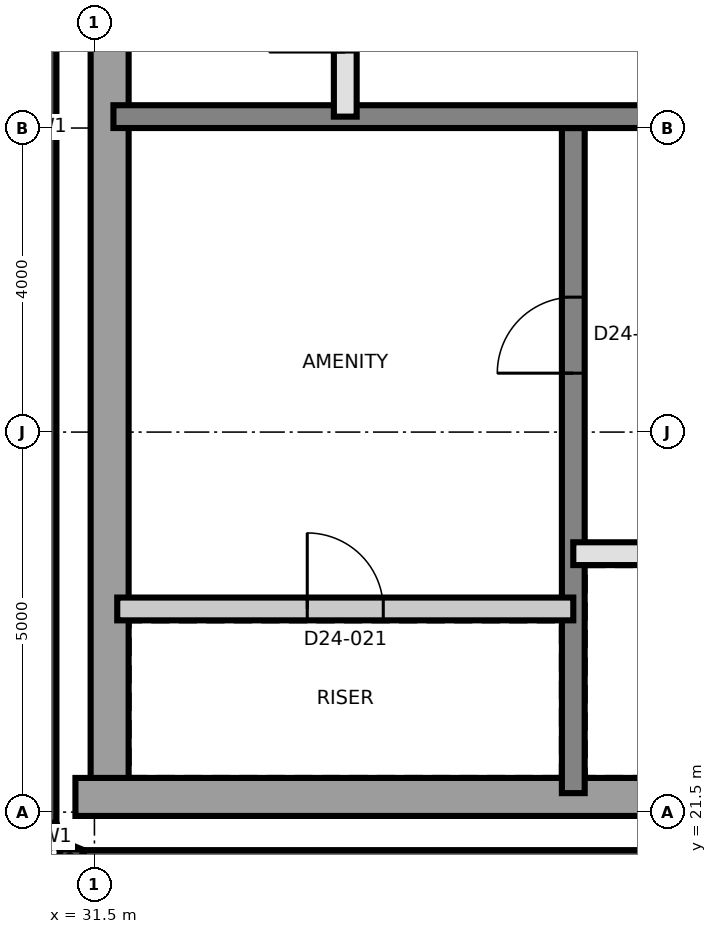
"""IFC4 building model, lengths in metres.
Left out: names, types, materials, properties, quantities, classifications, styles, units other than length and angle.
Written with IfcOpenShell. Run it as: python <this file> out.ifc"""

import sys

from ifc_helpers import new_model, si_unit, direction, frame, frame_2d, origin, place, context, subcontext, project, spatial, rectangle, extrude, element, fill, save


model = new_model("IFC4")
c1 = context("Model", 3, precision=1e-05, world=origin(), true_north=direction((0.0, 1.0)))
c2 = subcontext(c1, "Body", "Model", "MODEL_VIEW")
j1 = project(units=[si_unit("LENGTHUNIT", "METRE"), si_unit("PLANEANGLEUNIT", "RADIAN")], contexts=[c1])
p1 = place(None, origin())
s1 = spatial("IfcSite", under=j1, at=p1, CompositionType="ELEMENT")
p2 = place(p1, origin())
s2 = spatial("IfcBuilding", under=s1, at=p2, CompositionType="ELEMENT")
p3 = place(p2, frame((0.0, 0.0, 218.0)))
s3 = spatial("IfcBuildingStorey", under=s2, at=p3, CompositionType="ELEMENT", Elevation=218.0)
p4 = place(p3, frame((31.7, 21.75, 0.0), z_axis=(0.0, 0.0, 1.0), x_axis=(0.0, 1.0, 0.0)))
e1 = element("IfcWall", 1, at=p4, inside=s3, PredefinedType="SHEAR", context=c2, shape_type="SweptSolid", body=[
    extrude(rectangle(XDim=17.5, YDim=0.5, at=frame_2d((8.75, 0.0))), origin(), (0.0, 0.0, 1.0), 3.7),
])
p5 = place(p3, frame((31.25, 21.7, 0.0), z_axis=(0.0, 0.0, 1.0), x_axis=(1.0, 0.0, 0.0)))
e2 = element("IfcWall", 2, at=p5, inside=s3, PredefinedType="SHEAR", context=c2, shape_type="SweptSolid", body=[
    extrude(rectangle(XDim=27.0, YDim=0.5, at=frame_2d((13.5, 0.0))), origin(), (0.0, 0.0, 1.0), 3.7),
])
p6 = place(p3, frame((37.8, 21.75, 0.0), z_axis=(0.0, 0.0, 1.0), x_axis=(0.0, 1.0, 0.0)))
e3 = element("IfcWall", 3, at=p6, inside=s3, PredefinedType="SHEAR", context=c2, shape_type="SweptSolid", body=[
    extrude(rectangle(XDim=8.75, YDim=0.3, at=frame_2d((4.375, 0.0))), origin(), (0.0, 0.0, 1.0), 3.7),
])
p7 = place(p6, frame((5.525, 0.0, 0.0)))
e4 = element("IfcOpeningElement", 4, at=p7, cuts=e3, PredefinedType="OPENING", context=c2, shape_type="SweptSolid", body=[
    extrude(rectangle(XDim=1.0, YDim=2.1, at=frame_2d((0.5, 1.05))), frame((0.0, 0.16, 0.0), z_axis=(0.0, -1.0, 0.0), x_axis=(1.0, 0.0, 0.0)), (0.0, 0.0, 1.0), 0.32),
])
p8 = place(p3, frame((31.75, 30.65, 0.0), z_axis=(0.0, 0.0, 1.0), x_axis=(1.0, 0.0, 0.0)))
e5 = element("IfcWall", 5, at=p8, inside=s3, PredefinedType="SHEAR", context=c2, shape_type="SweptSolid", body=[
    extrude(rectangle(XDim=26.5, YDim=0.3, at=frame_2d((13.25, 0.0))), origin(), (0.0, 0.0, 1.0), 3.7),
])
p9 = place(p8, frame((24.75, 0.0, 0.0)))
e6 = element("IfcOpeningElement", 6, at=p9, cuts=e5, PredefinedType="OPENING", context=c2, shape_type="SweptSolid", body=[
    extrude(rectangle(XDim=1.0, YDim=2.1, at=frame_2d((0.5, 1.05))), frame((0.0, 0.16, 0.0), z_axis=(0.0, -1.0, 0.0), x_axis=(1.0, 0.0, 0.0)), (0.0, 0.0, 1.0), 0.32),
])
p10 = place(p3, frame((30.85, 39.67, 0.0), z_axis=(0.0, 0.0, 1.0), x_axis=(0.0, -1.0, 0.0)))
e7 = element("IfcWall", 7, at=p10, inside=s3, PredefinedType="SOLIDWALL", context=c2, shape_type="SweptSolid", body=[
    extrude(rectangle(XDim=18.31, YDim=0.3, at=frame_2d((9.155, 0.0))), origin(), (0.0, 0.0, 1.0), 3.4),
])
for number, where, z_axis, x_axis in (
    (8, (30.861, 21.302, 0.0), (0.0, 0.0, 1.0), (0.383, -0.924, 0.0)),
    (9, (31.048, 20.967, 0.0), (0.0, 0.0, 1.0), (0.924, -0.383, 0.0)),
):
    element("IfcWall", number, at=place(p3, frame(where, z_axis=z_axis, x_axis=x_axis)), inside=s3, PredefinedType="SOLIDWALL", context=c2, shape_type="SweptSolid", body=[
        extrude(rectangle(XDim=0.275, YDim=0.3, at=frame_2d((0.138, 0.0))), origin(), (0.0, 0.0, 1.0), 3.4),
    ])
p11 = place(p3, frame((31.36, 20.85, 0.0), z_axis=(0.0, 0.0, 1.0), x_axis=(1.0, 0.0, 0.0)))
e10 = element("IfcWall", 10, at=p11, inside=s3, PredefinedType="SOLIDWALL", context=c2, shape_type="SweptSolid", body=[
    extrude(rectangle(XDim=27.281, YDim=0.3, at=frame_2d((13.64, 0.0))), origin(), (0.0, 0.0, 1.0), 3.4),
])
p12 = place(p3, frame((31.8, 24.173, 0.0), z_axis=(0.0, 0.0, 1.0), x_axis=(1.0, 0.0, 0.0)))
e11 = element("IfcWall", 11, at=p12, inside=s3, PredefinedType="PARTITIONING", context=c2, shape_type="SweptSolid", body=[
    extrude(rectangle(XDim=6.0, YDim=0.3, at=frame_2d((3.0, 0.0))), origin(), (0.0, 0.0, 1.0), 3.4),
])
p13 = place(p12, frame((2.5, 0.0, 0.0)))
e12 = element("IfcOpeningElement", 12, at=p13, cuts=e11, PredefinedType="OPENING", context=c2, shape_type="SweptSolid", body=[
    extrude(rectangle(XDim=1.0, YDim=2.1, at=frame_2d((0.5, 1.05))), frame((0.0, 0.16, 0.0), z_axis=(0.0, -1.0, 0.0), x_axis=(1.0, 0.0, 0.0)), (0.0, 0.0, 1.0), 0.32),
])
p14 = place(p3, frame((37.8, 24.9, 0.0), z_axis=(0.0, 0.0, 1.0), x_axis=(1.0, 0.0, 0.0)))
e13 = element("IfcWall", 13, at=p14, inside=s3, PredefinedType="SOLIDWALL", context=c2, shape_type="SweptSolid", body=[
    extrude(rectangle(XDim=12.0, YDim=0.3, at=frame_2d((6.0, 0.0))), origin(), (0.0, 0.0, 1.0), 3.4),
])
p15 = place(p14, frame((1.05, 0.0, 0.0)))
e14 = element("IfcOpeningElement", 14, at=p15, cuts=e13, PredefinedType="OPENING", context=c2, shape_type="SweptSolid", body=[
    extrude(rectangle(XDim=0.9, YDim=2.1, at=frame_2d((0.45, 1.05))), frame((0.0, 0.16, 0.0), z_axis=(0.0, -1.0, 0.0), x_axis=(1.0, 0.0, 0.0)), (0.0, 0.0, 1.0), 0.32),
])
p16 = place(p14, frame((10.05, 0.0, 0.0)))
e15 = element("IfcOpeningElement", 15, at=p16, cuts=e13, PredefinedType="OPENING", context=c2, shape_type="SweptSolid", body=[
    extrude(rectangle(XDim=0.9, YDim=2.1, at=frame_2d((0.45, 1.05))), frame((0.0, 0.16, 0.0), z_axis=(0.0, -1.0, 0.0), x_axis=(1.0, 0.0, 0.0)), (0.0, 0.0, 1.0), 0.32),
])
p17 = place(p14, frame((3.95, 0.0, 0.0)))
e16 = element("IfcOpeningElement", 16, at=p17, cuts=e13, PredefinedType="OPENING", context=c2, shape_type="SweptSolid", body=[
    extrude(rectangle(XDim=1.1, YDim=2.4, at=frame_2d((0.55, 1.2))), frame((0.0, 0.16, 0.0), z_axis=(0.0, -1.0, 0.0), x_axis=(1.0, 0.0, 0.0)), (0.0, 0.0, 1.0), 0.32),
])
p18 = place(p14, frame((6.95, 0.0, 0.0)))
e17 = element("IfcOpeningElement", 17, at=p18, cuts=e13, PredefinedType="OPENING", context=c2, shape_type="SweptSolid", body=[
    extrude(rectangle(XDim=1.1, YDim=2.4, at=frame_2d((0.55, 1.2))), frame((0.0, 0.16, 0.0), z_axis=(0.0, -1.0, 0.0), x_axis=(1.0, 0.0, 0.0)), (0.0, 0.0, 1.0), 0.32),
])
p19 = place(p3, frame((34.8, 30.65, 0.0), z_axis=(0.0, 0.0, 1.0), x_axis=(0.0, 1.0, 0.0)))
e18 = element("IfcWall", 18, at=p19, inside=s3, PredefinedType="SOLIDWALL", context=c2, shape_type="SweptSolid", body=[
    extrude(rectangle(XDim=2.7, YDim=0.3, at=frame_2d((1.35, 0.0))), origin(), (0.0, 0.0, 1.0), 3.4),
])
p20 = place(p19, frame((0.85, 0.0, 0.0)))
e19 = element("IfcOpeningElement", 19, at=p20, cuts=e18, PredefinedType="OPENING", context=c2, shape_type="SweptSolid", body=[
    extrude(rectangle(XDim=1.0, YDim=2.1, at=frame_2d((0.5, 1.05))), frame((0.0, 0.16, 0.0), z_axis=(0.0, -1.0, 0.0), x_axis=(1.0, 0.0, 0.0)), (0.0, 0.0, 1.0), 0.32),
])
p21 = place(p7, origin())
e20 = element("IfcDoor", 20, at=p21, inside=s3, OperationType="SINGLE_SWING_LEFT", PredefinedType="DOOR", context=c2, shape_type="SweptSolid", body=[
    extrude(rectangle(XDim=1.0, YDim=2.1, at=frame_2d((0.5, 1.05))), frame((0.0, 0.025, 0.0), z_axis=(0.0, -1.0, 0.0), x_axis=(1.0, 0.0, 0.0)), (0.0, 0.0, 1.0), 0.05),
])
fill(e4, e20)
p22 = place(p13, origin())
e21 = element("IfcDoor", 21, at=p22, inside=s3, OperationType="SINGLE_SWING_RIGHT", PredefinedType="DOOR", context=c2, shape_type="SweptSolid", body=[
    extrude(rectangle(XDim=1.0, YDim=2.1, at=frame_2d((0.5, 1.05))), frame((0.0, 0.025, 0.0), z_axis=(0.0, -1.0, 0.0), x_axis=(1.0, 0.0, 0.0)), (0.0, 0.0, 1.0), 0.05),
])
fill(e12, e21)
save(model, sys.argv[1])
